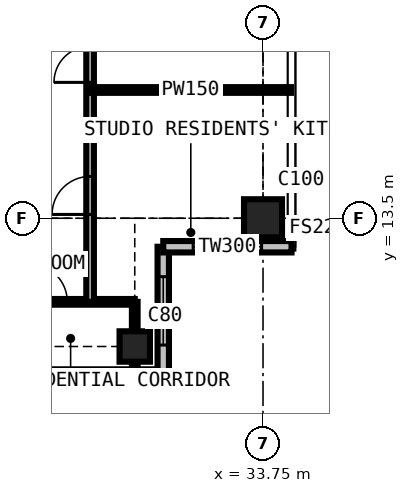
"""IFC4 building model, lengths in metres.
Left out: names, types, materials, properties, quantities, classifications, styles, units other than length and angle.
Written with IfcOpenShell. Run it as: python <this file> out.ifc"""

import sys

from ifc_helpers import new_model, si_unit, direction, frame, frame_2d, origin, origin_2d, place, context, subcontext, project, spatial, rectangle, extrude, element, fill, save


model = new_model("IFC4")
c1 = context("Model", 3, precision=1e-05, world=origin(), true_north=direction((0.0, 1.0)))
c2 = subcontext(c1, "Body", "Model", "MODEL_VIEW")
j1 = project(units=[si_unit("LENGTHUNIT", "METRE"), si_unit("PLANEANGLEUNIT", "RADIAN")], contexts=[c1])
p1 = place(None, origin())
s1 = spatial("IfcSite", under=j1, at=p1, CompositionType="ELEMENT")
p2 = place(p1, origin())
s2 = spatial("IfcBuilding", under=s1, at=p2, CompositionType="ELEMENT")
p3 = place(p2, frame((0.0, 0.0, 229.5)))
s3 = spatial("IfcBuildingStorey", under=s2, at=p3, CompositionType="ELEMENT", Elevation=229.5)
p4 = place(p3, frame((30.375, 10.125, 0.0), z_axis=(0.0, 0.0, 1.0), x_axis=(1.0, 0.0, 0.0)))
e1 = element("IfcColumn", 1, at=p4, inside=s3, PredefinedType="COLUMN", context=c2, shape_type="SweptSolid", body=[
    extrude(rectangle(XDim=0.8, YDim=0.8, at=origin_2d()), origin(), (0.0, 0.0, 1.0), 3.6),
])
p5 = place(p3, frame((33.75, 13.5, 0.0), z_axis=(0.0, 0.0, 1.0), x_axis=(1.0, 0.0, 0.0)))
e2 = element("IfcColumn", 2, at=p5, inside=s3, PredefinedType="COLUMN", context=c2, shape_type="SweptSolid", body=[
    extrude(rectangle(XDim=1.0, YDim=1.0, at=origin_2d()), origin(), (0.0, 0.0, 1.0), 3.6),
])
p6 = place(p3, frame((27.75, 9.375, 0.0), z_axis=(0.0, 0.0, 1.0), x_axis=(1.0, 0.0, 0.0)))
e3 = element("IfcWall", 3, at=p6, inside=s3, PredefinedType="SOLIDWALL", context=c2, shape_type="SweptSolid", body=[
    extrude(rectangle(XDim=3.375, YDim=0.3, at=frame_2d((1.688, 0.0))), origin(), (0.0, 0.0, 1.0), 3.375),
])
p7 = place(p6, frame((0.788, 0.0, 0.6)))
e4 = element("IfcOpeningElement", 4, at=p7, cuts=e3, PredefinedType="OPENING", context=c2, shape_type="SweptSolid", body=[
    extrude(rectangle(XDim=1.8, YDim=2.1, at=frame_2d((0.9, 1.05))), frame((0.0, 0.16, 0.0), z_axis=(0.0, -1.0, 0.0), x_axis=(1.0, 0.0, 0.0)), (0.0, 0.0, 1.0), 0.32),
])
p8 = place(p3, frame((31.125, 9.375, 0.0), z_axis=(0.0, 0.0, 1.0), x_axis=(0.0, 1.0, 0.0)))
e5 = element("IfcWall", 5, at=p8, inside=s3, PredefinedType="SOLIDWALL", context=c2, shape_type="SweptSolid", body=[
    extrude(rectangle(XDim=3.375, YDim=0.3, at=frame_2d((1.688, 0.0))), origin(), (0.0, 0.0, 1.0), 3.375),
])
p9 = place(p8, frame((0.788, 0.0, 0.6)))
e6 = element("IfcOpeningElement", 6, at=p9, cuts=e5, PredefinedType="OPENING", context=c2, shape_type="SweptSolid", body=[
    extrude(rectangle(XDim=1.8, YDim=2.1, at=frame_2d((0.9, 1.05))), frame((0.0, 0.16, 0.0), z_axis=(0.0, -1.0, 0.0), x_axis=(1.0, 0.0, 0.0)), (0.0, 0.0, 1.0), 0.32),
])
p10 = place(p3, frame((31.125, 12.75, 0.0), z_axis=(0.0, 0.0, 1.0), x_axis=(1.0, 0.0, 0.0)))
e7 = element("IfcWall", 7, at=p10, inside=s3, PredefinedType="SOLIDWALL", context=c2, shape_type="SweptSolid", body=[
    extrude(rectangle(XDim=3.375, YDim=0.3, at=frame_2d((1.688, 0.0))), origin(), (0.0, 0.0, 1.0), 3.375),
])
p11 = place(p10, frame((0.788, 0.0, 0.6)))
e8 = element("IfcOpeningElement", 8, at=p11, cuts=e7, PredefinedType="OPENING", context=c2, shape_type="SweptSolid", body=[
    extrude(rectangle(XDim=1.8, YDim=2.1, at=frame_2d((0.9, 1.05))), frame((0.0, 0.16, 0.0), z_axis=(0.0, -1.0, 0.0), x_axis=(1.0, 0.0, 0.0)), (0.0, 0.0, 1.0), 0.32),
])
p12 = place(p3, frame((10.125, 11.3, 0.0), z_axis=(0.0, 0.0, 1.0), x_axis=(1.0, 0.0, 0.0)))
e9 = element("IfcWall", 9, at=p12, inside=s3, PredefinedType="PARTITIONING", context=c2, shape_type="SweptSolid", body=[
    extrude(rectangle(XDim=20.25, YDim=0.15, at=frame_2d((10.125, 0.0))), origin(), (0.0, 0.0, 1.0), 3.375),
])
p13 = place(p12, frame((11.725, 0.0, 0.0)))
e10 = element("IfcOpeningElement", 10, at=p13, cuts=e9, PredefinedType="OPENING", context=c2, shape_type="SweptSolid", body=[
    extrude(rectangle(XDim=0.95, YDim=2.2, at=frame_2d((0.475, 1.1))), frame((0.0, 0.085, 0.0), z_axis=(0.0, -1.0, 0.0), x_axis=(1.0, 0.0, 0.0)), (0.0, 0.0, 1.0), 0.17),
])
p14 = place(p12, frame((4.975, 0.0, 0.0)))
e11 = element("IfcOpeningElement", 11, at=p14, cuts=e9, PredefinedType="OPENING", context=c2, shape_type="SweptSolid", body=[
    extrude(rectangle(XDim=0.95, YDim=2.2, at=frame_2d((0.475, 1.1))), frame((0.0, 0.085, 0.0), z_axis=(0.0, -1.0, 0.0), x_axis=(1.0, 0.0, 0.0)), (0.0, 0.0, 1.0), 0.17),
])
p15 = place(p12, frame((2.2, 0.0, 0.0)))
e12 = element("IfcOpeningElement", 12, at=p15, cuts=e9, PredefinedType="OPENING", context=c2, shape_type="SweptSolid", body=[
    extrude(rectangle(XDim=0.95, YDim=2.2, at=frame_2d((0.475, 1.1))), frame((0.0, 0.085, 0.0), z_axis=(0.0, -1.0, 0.0), x_axis=(1.0, 0.0, 0.0)), (0.0, 0.0, 1.0), 0.17),
])
p16 = place(p12, frame((17.475, 0.0, 0.0)))
e13 = element("IfcOpeningElement", 13, at=p16, cuts=e9, PredefinedType="OPENING", context=c2, shape_type="SweptSolid", body=[
    extrude(rectangle(XDim=1.0, YDim=2.2, at=frame_2d((0.5, 1.1))), frame((0.0, 0.085, 0.0), z_axis=(0.0, -1.0, 0.0), x_axis=(1.0, 0.0, 0.0)), (0.0, 0.0, 1.0), 0.17),
])
p17 = place(p3, frame((29.2, 11.3, 0.0), z_axis=(0.0, 0.0, 1.0), x_axis=(0.0, 1.0, 0.0)))
e14 = element("IfcWall", 14, at=p17, inside=s3, PredefinedType="PARTITIONING", context=c2, shape_type="SweptSolid", body=[
    extrude(rectangle(XDim=17.9, YDim=0.2, at=frame_2d((8.95, 0.0))), origin(), (0.0, 0.0, 1.0), 3.375),
])
p18 = place(p17, frame((2.3, 0.0, 0.0)))
e15 = element("IfcOpeningElement", 15, at=p18, cuts=e14, PredefinedType="OPENING", context=c2, shape_type="SweptSolid", body=[
    extrude(rectangle(XDim=1.0, YDim=2.2, at=frame_2d((0.5, 1.1))), frame((0.0, 0.11, 0.0), z_axis=(0.0, -1.0, 0.0), x_axis=(1.0, 0.0, 0.0)), (0.0, 0.0, 1.0), 0.22),
])
p19 = place(p17, frame((10.55, 0.0, 0.0)))
e16 = element("IfcOpeningElement", 16, at=p19, cuts=e14, PredefinedType="OPENING", context=c2, shape_type="SweptSolid", body=[
    extrude(rectangle(XDim=0.95, YDim=2.2, at=frame_2d((0.475, 1.1))), frame((0.0, 0.11, 0.0), z_axis=(0.0, -1.0, 0.0), x_axis=(1.0, 0.0, 0.0)), (0.0, 0.0, 1.0), 0.22),
])
p20 = place(p17, frame((5.775, 0.0, 0.0)))
e17 = element("IfcOpeningElement", 17, at=p20, cuts=e14, PredefinedType="OPENING", context=c2, shape_type="SweptSolid", body=[
    extrude(rectangle(XDim=0.95, YDim=2.2, at=frame_2d((0.475, 1.1))), frame((0.0, 0.11, 0.0), z_axis=(0.0, -1.0, 0.0), x_axis=(1.0, 0.0, 0.0)), (0.0, 0.0, 1.0), 0.22),
])
p21 = place(p17, frame((16.3, 0.0, 0.0)))
e18 = element("IfcOpeningElement", 18, at=p21, cuts=e14, PredefinedType="OPENING", context=c2, shape_type="SweptSolid", body=[
    extrude(rectangle(XDim=1.0, YDim=2.2, at=frame_2d((0.5, 1.1))), frame((0.0, 0.11, 0.0), z_axis=(0.0, -1.0, 0.0), x_axis=(1.0, 0.0, 0.0)), (0.0, 0.0, 1.0), 0.22),
])
p22 = place(p3, frame((29.2, 16.875, 0.0), z_axis=(0.0, 0.0, 1.0), x_axis=(1.0, 0.0, 0.0)))
e19 = element("IfcWall", 19, at=p22, inside=s3, PredefinedType="PARTITIONING", context=c2, shape_type="SweptSolid", body=[
    extrude(rectangle(XDim=5.284, YDim=0.15, at=frame_2d((2.642, 0.0))), origin(), (0.0, 0.0, 1.0), 3.375),
])
p23 = place(p3, frame((30.375, 9.525, 0.0), z_axis=(0.0, 0.0, 1.0), x_axis=(0.0, 1.0, 0.0)))
e20 = element("IfcWall", 20, at=p23, inside=s3, PredefinedType="PARTITIONING", context=c2, shape_type="SweptSolid", body=[
    extrude(rectangle(XDim=1.775, YDim=0.15, at=frame_2d((0.888, 0.0))), origin(), (0.0, 0.0, 1.0), 2.877),
])
p24 = place(p7, origin())
e21 = element("IfcWindow", 21, at=p24, inside=s3, PartitioningType="SINGLE_PANEL", PredefinedType="WINDOW", context=c2, shape_type="SweptSolid", body=[
    extrude(rectangle(XDim=1.8, YDim=2.1, at=frame_2d((0.9, 1.05))), frame((0.0, 0.03, 0.0), z_axis=(0.0, -1.0, 0.0), x_axis=(1.0, 0.0, 0.0)), (0.0, 0.0, 1.0), 0.06),
])
fill(e4, e21)
p25 = place(p9, origin())
e22 = element("IfcWindow", 22, at=p25, inside=s3, PartitioningType="SINGLE_PANEL", PredefinedType="WINDOW", context=c2, shape_type="SweptSolid", body=[
    extrude(rectangle(XDim=1.8, YDim=2.1, at=frame_2d((0.9, 1.05))), frame((0.0, 0.03, 0.0), z_axis=(0.0, -1.0, 0.0), x_axis=(1.0, 0.0, 0.0)), (0.0, 0.0, 1.0), 0.06),
])
fill(e6, e22)
p26 = place(p11, origin())
e23 = element("IfcWindow", 23, at=p26, inside=s3, PartitioningType="SINGLE_PANEL", PredefinedType="WINDOW", context=c2, shape_type="SweptSolid", body=[
    extrude(rectangle(XDim=1.8, YDim=2.1, at=frame_2d((0.9, 1.05))), frame((0.0, 0.03, 0.0), z_axis=(0.0, -1.0, 0.0), x_axis=(1.0, 0.0, 0.0)), (0.0, 0.0, 1.0), 0.06),
])
fill(e8, e23)
p27 = place(p16, origin())
e24 = element("IfcDoor", 24, at=p27, inside=s3, OperationType="SINGLE_SWING_LEFT", PredefinedType="DOOR", context=c2, shape_type="SweptSolid", body=[
    extrude(rectangle(XDim=1.0, YDim=2.2, at=frame_2d((0.5, 1.1))), frame((0.0, 0.025, 0.0), z_axis=(0.0, -1.0, 0.0), x_axis=(1.0, 0.0, 0.0)), (0.0, 0.0, 1.0), 0.05),
])
fill(e13, e24)
p28 = place(p18, origin())
e25 = element("IfcDoor", 25, at=p28, inside=s3, OperationType="SINGLE_SWING_LEFT", PredefinedType="DOOR", context=c2, shape_type="SweptSolid", body=[
    extrude(rectangle(XDim=1.0, YDim=2.2, at=frame_2d((0.5, 1.1))), frame((0.0, 0.025, 0.0), z_axis=(0.0, -1.0, 0.0), x_axis=(1.0, 0.0, 0.0)), (0.0, 0.0, 1.0), 0.05),
])
fill(e15, e25)
p29 = place(p20, origin())
e26 = element("IfcDoor", 26, at=p29, inside=s3, OperationType="SINGLE_SWING_LEFT", PredefinedType="DOOR", context=c2, shape_type="SweptSolid", body=[
    extrude(rectangle(XDim=0.95, YDim=2.2, at=frame_2d((0.475, 1.1))), frame((0.0, 0.025, 0.0), z_axis=(0.0, -1.0, 0.0), x_axis=(1.0, 0.0, 0.0)), (0.0, 0.0, 1.0), 0.05),
])
fill(e17, e26)
save(model, sys.argv[1])
